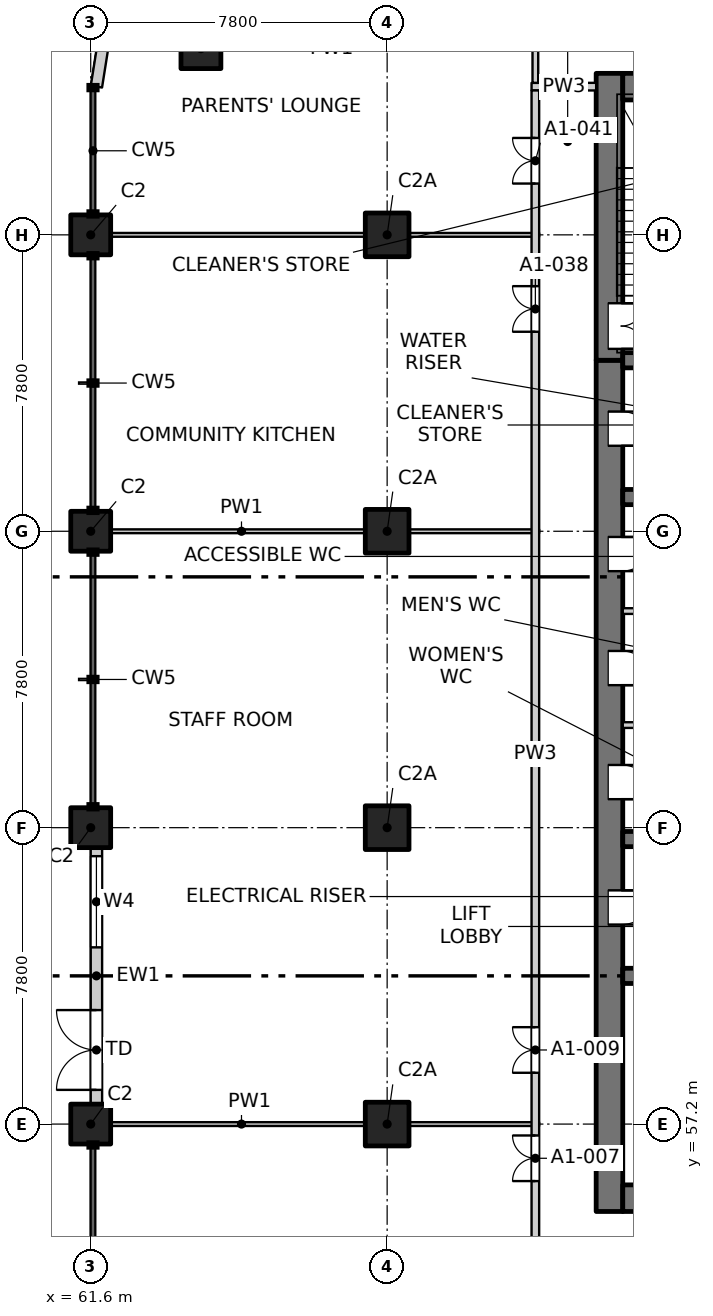
"""IFC4 building model, lengths in metres.
Left out: names, types, materials, properties, quantities, classifications, styles, units other than length and angle.
Written with IfcOpenShell. Run it as: python <this file> out.ifc"""

import sys

from ifc_helpers import new_model, si_unit, direction, frame, frame_2d, origin, origin_2d, place, context, subcontext, project, spatial, rectangle, extrude, element, fill, save


model = new_model("IFC4")
c1 = context("Model", 3, precision=1e-05, world=origin(), true_north=direction((0.0, 1.0)))
c2 = subcontext(c1, "Body", "Model", "MODEL_VIEW")
j1 = project(units=[si_unit("LENGTHUNIT", "METRE"), si_unit("PLANEANGLEUNIT", "RADIAN")], contexts=[c1])
p1 = place(None, origin())
s1 = spatial("IfcSite", under=j1, at=p1, CompositionType="ELEMENT")
p2 = place(p1, origin())
s2 = spatial("IfcBuilding", under=s1, at=p2, CompositionType="ELEMENT")
p3 = place(p2, frame((0.0, 0.0, 15.0)))
s3 = spatial("IfcBuildingStorey", under=s2, at=p3, CompositionType="ELEMENT", Elevation=15.0)
for number, where, z_axis, x_axis in (
    (1, (64.5, 85.5, -0.35), (0.0, 0.0, 1.0), (1.0, 0.0, 0.0)),
    (2, (61.6, 57.2, -0.35), (0.0, 0.0, 1.0), (1.0, 0.0, 0.0)),
    (3, (61.6, 65.0, -0.35), (0.0, 0.0, 1.0), (1.0, 0.0, 0.0)),
    (4, (61.6, 72.8, -0.35), (0.0, 0.0, 1.0), (1.0, 0.0, 0.0)),
    (5, (61.6, 80.6, -0.35), (0.0, 0.0, 1.0), (1.0, 0.0, 0.0)),
):
    element("IfcColumn", number, at=place(p3, frame(where, z_axis=z_axis, x_axis=x_axis)), inside=s3, PredefinedType="COLUMN", context=c2, shape_type="SweptSolid", body=[
        extrude(rectangle(XDim=1.05, YDim=1.05, at=origin_2d()), origin(), (0.0, 0.0, 1.0), 4.6),
    ])
for number, where, z_axis, x_axis in (
    (6, (69.4, 57.2, -0.35), (0.0, 0.0, 1.0), (1.0, 0.0, 0.0)),
    (7, (69.4, 65.0, -0.35), (0.0, 0.0, 1.0), (1.0, 0.0, 0.0)),
    (8, (69.4, 72.8, -0.35), (0.0, 0.0, 1.0), (1.0, 0.0, 0.0)),
    (9, (69.4, 80.6, -0.35), (0.0, 0.0, 1.0), (1.0, 0.0, 0.0)),
):
    element("IfcColumn", number, at=place(p3, frame(where, z_axis=z_axis, x_axis=x_axis)), inside=s3, PredefinedType="COLUMN", context=c2, shape_type="SweptSolid", body=[
        extrude(rectangle(XDim=1.15, YDim=1.15, at=origin_2d()), origin(), (0.0, 0.0, 1.0), 4.6),
    ])
p4 = place(p3, frame((75.25, 54.9, -0.35), z_axis=(0.0, 0.0, 1.0), x_axis=(0.0, 1.0, 0.0)))
e10 = element("IfcWall", 10, at=p4, inside=s3, PredefinedType="SOLIDWALL", context=c2, shape_type="SweptSolid", body=[
    extrude(rectangle(XDim=22.4, YDim=0.7, at=frame_2d((11.2, 0.0))), origin(), (0.0, 0.0, 1.0), 4.6),
])
p5 = place(p4, frame((7.55, 0.0, 0.35)))
e11 = element("IfcOpeningElement", 11, at=p5, cuts=e10, PredefinedType="OPENING", context=c2, shape_type="SweptSolid", body=[
    extrude(rectangle(XDim=0.9, YDim=2.1, at=frame_2d((0.45, 1.05))), frame((0.0, 0.36, 0.0), z_axis=(0.0, -1.0, 0.0), x_axis=(1.0, 0.0, 0.0)), (0.0, 0.0, 1.0), 0.72),
])
p6 = place(p4, frame((10.85, 0.0, 0.35)))
e12 = element("IfcOpeningElement", 12, at=p6, cuts=e10, PredefinedType="OPENING", context=c2, shape_type="SweptSolid", body=[
    extrude(rectangle(XDim=0.9, YDim=2.1, at=frame_2d((0.45, 1.05))), frame((0.0, 0.36, 0.0), z_axis=(0.0, -1.0, 0.0), x_axis=(1.0, 0.0, 0.0)), (0.0, 0.0, 1.0), 0.72),
])
p7 = place(p4, frame((13.85, 0.0, 0.35)))
e13 = element("IfcOpeningElement", 13, at=p7, cuts=e10, PredefinedType="OPENING", context=c2, shape_type="SweptSolid", body=[
    extrude(rectangle(XDim=0.9, YDim=2.1, at=frame_2d((0.45, 1.05))), frame((0.0, 0.36, 0.0), z_axis=(0.0, -1.0, 0.0), x_axis=(1.0, 0.0, 0.0)), (0.0, 0.0, 1.0), 0.72),
])
p8 = place(p4, frame((16.85, 0.0, 0.35)))
e14 = element("IfcOpeningElement", 14, at=p8, cuts=e10, PredefinedType="OPENING", context=c2, shape_type="SweptSolid", body=[
    extrude(rectangle(XDim=0.9, YDim=2.1, at=frame_2d((0.45, 1.05))), frame((0.0, 0.36, 0.0), z_axis=(0.0, -1.0, 0.0), x_axis=(1.0, 0.0, 0.0)), (0.0, 0.0, 1.0), 0.72),
])
p9 = place(p4, frame((20.15, 0.0, 0.35)))
e15 = element("IfcOpeningElement", 15, at=p9, cuts=e10, PredefinedType="OPENING", context=c2, shape_type="SweptSolid", body=[
    extrude(rectangle(XDim=0.9, YDim=2.1, at=frame_2d((0.45, 1.05))), frame((0.0, 0.36, 0.0), z_axis=(0.0, -1.0, 0.0), x_axis=(1.0, 0.0, 0.0)), (0.0, 0.0, 1.0), 0.72),
])
p10 = place(p3, frame((75.25, 77.3, -0.35), z_axis=(0.0, 0.0, 1.0), x_axis=(0.0, 1.0, 0.0)))
e16 = element("IfcWall", 16, at=p10, inside=s3, PredefinedType="SOLIDWALL", context=c2, shape_type="SweptSolid", body=[
    extrude(rectangle(XDim=7.55, YDim=0.7, at=frame_2d((3.775, 0.0))), origin(), (0.0, 0.0, 1.0), 4.6),
])
p11 = place(p10, frame((0.3, 0.0, 0.35)))
e17 = element("IfcOpeningElement", 17, at=p11, cuts=e16, PredefinedType="OPENING", context=c2, shape_type="SweptSolid", body=[
    extrude(rectangle(XDim=1.2, YDim=2.1, at=frame_2d((0.6, 1.05))), frame((0.0, 0.36, 0.0), z_axis=(0.0, -1.0, 0.0), x_axis=(1.0, 0.0, 0.0)), (0.0, 0.0, 1.0), 0.72),
])
p12 = place(p3, frame((75.6, 55.25, -0.35), z_axis=(0.0, 0.0, 1.0), x_axis=(1.0, 0.0, 0.0)))
e18 = element("IfcWall", 18, at=p12, inside=s3, PredefinedType="SOLIDWALL", context=c2, shape_type="SweptSolid", body=[
    extrude(rectangle(XDim=18.8, YDim=0.7, at=frame_2d((9.4, 0.0))), origin(), (0.0, 0.0, 1.0), 4.6),
])
p13 = place(p12, frame((8.65, 0.0, 0.35)))
e19 = element("IfcOpeningElement", 19, at=p13, cuts=e18, PredefinedType="OPENING", context=c2, shape_type="SweptSolid", body=[
    extrude(rectangle(XDim=1.5, YDim=2.1, at=frame_2d((0.75, 1.05))), frame((0.0, 0.36, 0.0), z_axis=(0.0, -1.0, 0.0), x_axis=(1.0, 0.0, 0.0)), (0.0, 0.0, 1.0), 0.72),
])
p14 = place(p3, frame((75.6, 84.5, -0.35), z_axis=(0.0, 0.0, 1.0), x_axis=(1.0, 0.0, 0.0)))
e20 = element("IfcWall", 20, at=p14, inside=s3, PredefinedType="SOLIDWALL", context=c2, shape_type="SweptSolid", body=[
    extrude(rectangle(XDim=18.8, YDim=0.7, at=frame_2d((9.4, 0.0))), origin(), (0.0, 0.0, 1.0), 4.6),
])
for number, where, z_axis, x_axis in (
    (21, (75.6, 61.1, -0.35), (0.0, 0.0, 1.0), (1.0, 0.0, 0.0)),
    (22, (75.6, 64.7, -0.35), (0.0, 0.0, 1.0), (1.0, 0.0, 0.0)),
    (23, (75.6, 73.7, -0.35), (0.0, 0.0, 1.0), (1.0, 0.0, 0.0)),
    (24, (75.6, 77.3, -0.35), (0.0, 0.0, 1.0), (1.0, 0.0, 0.0)),
):
    element("IfcWall", number, at=place(p3, frame(where, z_axis=z_axis, x_axis=x_axis)), inside=s3, PredefinedType="SOLIDWALL", context=c2, shape_type="SweptSolid", body=[
        extrude(rectangle(XDim=3.65, YDim=0.4, at=frame_2d((1.825, 0.0))), origin(), (0.0, 0.0, 1.0), 4.6),
    ])
p15 = place(p3, frame((61.75, 57.725, 0.0), z_axis=(0.0, 0.0, 1.0), x_axis=(0.0, 1.0, 0.0)))
e25 = element("IfcWall", 25, at=p15, inside=s3, PredefinedType="SOLIDWALL", context=c2, shape_type="SweptSolid", body=[
    extrude(rectangle(XDim=6.75, YDim=0.3, at=frame_2d((3.375, 0.0))), origin(), (0.0, 0.0, 1.0), 3.8),
])
p16 = place(p15, frame((0.375, 0.0, 0.0)))
e26 = element("IfcOpeningElement", 26, at=p16, cuts=e25, PredefinedType="OPENING", context=c2, shape_type="SweptSolid", body=[
    extrude(rectangle(XDim=2.1, YDim=2.4, at=frame_2d((1.05, 1.2))), frame((0.0, 0.16, 0.0), z_axis=(0.0, -1.0, 0.0), x_axis=(1.0, 0.0, 0.0)), (0.0, 0.0, 1.0), 0.32),
])
p17 = place(p15, frame((4.125, 0.0, 0.6)))
e27 = element("IfcOpeningElement", 27, at=p17, cuts=e25, PredefinedType="OPENING", context=c2, shape_type="SweptSolid", body=[
    extrude(rectangle(XDim=2.4, YDim=2.1, at=frame_2d((1.2, 1.05))), frame((0.0, 0.16, 0.0), z_axis=(0.0, -1.0, 0.0), x_axis=(1.0, 0.0, 0.0)), (0.0, 0.0, 1.0), 0.32),
])
p18 = place(p3, frame((61.934, 85.659, 0.0), z_axis=(0.0, 0.0, 1.0), x_axis=(-0.156496880861, -0.987678452879, 0.0)))
e28 = element("IfcWall", 28, at=p18, inside=s3, PredefinedType="SOLIDWALL", context=c2, shape_type="SweptSolid", body=[
    extrude(rectangle(XDim=1.173, YDim=0.3, at=frame_2d((0.586, 0.0))), origin(), (0.0, 0.0, 1.0), 3.8),
])
p19 = place(p3, frame((61.735, 57.2, 0.0), z_axis=(0.0, 0.0, 1.0), x_axis=(1.0, 0.0, 0.0)))
e29 = element("IfcWall", 29, at=p19, inside=s3, PredefinedType="PARTITIONING", context=c2, shape_type="SweptSolid", body=[
    extrude(rectangle(XDim=7.665, YDim=0.1, at=frame_2d((3.833, 0.0))), origin(), (0.0, 0.0, 1.0), 3.65),
])
p20 = place(p3, frame((69.4, 57.2, 0.0), z_axis=(0.0, 0.0, 1.0), x_axis=(1.0, 0.0, 0.0)))
e30 = element("IfcWall", 30, at=p20, inside=s3, PredefinedType="PARTITIONING", context=c2, shape_type="SweptSolid", body=[
    extrude(rectangle(XDim=4.0, YDim=0.1, at=frame_2d((2.0, 0.0))), origin(), (0.0, 0.0, 1.0), 4.25),
])
for number, where, z_axis, x_axis in (
    (31, (75.6, 67.7, 0.0), (0.0, 0.0, 1.0), (1.0, 0.0, 0.0)),
    (32, (75.6, 70.7, 0.0), (0.0, 0.0, 1.0), (1.0, 0.0, 0.0)),
):
    element("IfcWall", number, at=place(p3, frame(where, z_axis=z_axis, x_axis=x_axis)), inside=s3, PredefinedType="PARTITIONING", context=c2, shape_type="SweptSolid", body=[
        extrude(rectangle(XDim=3.65, YDim=0.15, at=frame_2d((1.825, 0.0))), origin(), (0.0, 0.0, 1.0), 4.25),
    ])
p21 = place(p3, frame((61.735, 72.8, 0.0), z_axis=(0.0, 0.0, 1.0), x_axis=(1.0, 0.0, 0.0)))
e33 = element("IfcWall", 33, at=p21, inside=s3, PredefinedType="PARTITIONING", context=c2, shape_type="SweptSolid", body=[
    extrude(rectangle(XDim=7.665, YDim=0.1, at=frame_2d((3.833, 0.0))), origin(), (0.0, 0.0, 1.0), 3.65),
])
p22 = place(p3, frame((69.4, 72.8, 0.0), z_axis=(0.0, 0.0, 1.0), x_axis=(1.0, 0.0, 0.0)))
e34 = element("IfcWall", 34, at=p22, inside=s3, PredefinedType="PARTITIONING", context=c2, shape_type="SweptSolid", body=[
    extrude(rectangle(XDim=4.0, YDim=0.1, at=frame_2d((2.0, 0.0))), origin(), (0.0, 0.0, 1.0), 4.25),
])
p23 = place(p3, frame((61.735, 80.6, 0.0), z_axis=(0.0, 0.0, 1.0), x_axis=(1.0, 0.0, 0.0)))
e35 = element("IfcWall", 35, at=p23, inside=s3, PredefinedType="PARTITIONING", context=c2, shape_type="SweptSolid", body=[
    extrude(rectangle(XDim=7.665, YDim=0.1, at=frame_2d((3.833, 0.0))), origin(), (0.0, 0.0, 1.0), 3.65),
])
p24 = place(p3, frame((69.4, 80.6, 0.0), z_axis=(0.0, 0.0, 1.0), x_axis=(1.0, 0.0, 0.0)))
e36 = element("IfcWall", 36, at=p24, inside=s3, PredefinedType="PARTITIONING", context=c2, shape_type="SweptSolid", body=[
    extrude(rectangle(XDim=4.0, YDim=0.1, at=frame_2d((2.0, 0.0))), origin(), (0.0, 0.0, 1.0), 4.25),
])
p25 = place(p3, frame((73.2, 84.5, 0.0), z_axis=(0.0, 0.0, 1.0), x_axis=(1.0, 0.0, 0.0)))
e37 = element("IfcWall", 37, at=p25, inside=s3, PredefinedType="PARTITIONING", context=c2, shape_type="SweptSolid", body=[
    extrude(rectangle(XDim=1.7, YDim=0.2, at=frame_2d((0.85, 0.0))), origin(), (0.0, 0.0, 1.0), 4.25),
])
p26 = place(p3, frame((73.3, 49.5, 0.0), z_axis=(0.0, 0.0, 1.0), x_axis=(0.0, 1.0, 0.0)))
e38 = element("IfcWall", 38, at=p26, inside=s3, PredefinedType="PARTITIONING", context=c2, shape_type="SweptSolid", body=[
    extrude(rectangle(XDim=34.9, YDim=0.2, at=frame_2d((17.45, 0.0))), origin(), (0.0, 0.0, 1.0), 4.25),
])
p27 = place(p26, frame((6.2, 0.0, 0.0)))
e39 = element("IfcOpeningElement", 39, at=p27, cuts=e38, PredefinedType="OPENING", context=c2, shape_type="SweptSolid", body=[
    extrude(rectangle(XDim=1.2, YDim=2.1, at=frame_2d((0.6, 1.05))), frame((0.0, 0.11, 0.0), z_axis=(0.0, -1.0, 0.0), x_axis=(1.0, 0.0, 0.0)), (0.0, 0.0, 1.0), 0.22),
])
p28 = place(p26, frame((9.05, 0.0, 0.0)))
e40 = element("IfcOpeningElement", 40, at=p28, cuts=e38, PredefinedType="OPENING", context=c2, shape_type="SweptSolid", body=[
    extrude(rectangle(XDim=1.2, YDim=2.1, at=frame_2d((0.6, 1.05))), frame((0.0, 0.11, 0.0), z_axis=(0.0, -1.0, 0.0), x_axis=(1.0, 0.0, 0.0)), (0.0, 0.0, 1.0), 0.22),
])
p29 = place(p26, frame((28.55, 0.0, 0.0)))
e41 = element("IfcOpeningElement", 41, at=p29, cuts=e38, PredefinedType="OPENING", context=c2, shape_type="SweptSolid", body=[
    extrude(rectangle(XDim=1.2, YDim=2.1, at=frame_2d((0.6, 1.05))), frame((0.0, 0.11, 0.0), z_axis=(0.0, -1.0, 0.0), x_axis=(1.0, 0.0, 0.0)), (0.0, 0.0, 1.0), 0.22),
])
p30 = place(p26, frame((32.45, 0.0, 0.0)))
e42 = element("IfcOpeningElement", 42, at=p30, cuts=e38, PredefinedType="OPENING", context=c2, shape_type="SweptSolid", body=[
    extrude(rectangle(XDim=1.2, YDim=2.1, at=frame_2d((0.6, 1.05))), frame((0.0, 0.11, 0.0), z_axis=(0.0, -1.0, 0.0), x_axis=(1.0, 0.0, 0.0)), (0.0, 0.0, 1.0), 0.22),
])
p31 = place(p3, frame((73.3, 84.6, 0.0), z_axis=(0.0, 0.0, 1.0), x_axis=(0.0, 1.0, 0.0)))
e43 = element("IfcWall", 43, at=p31, inside=s3, PredefinedType="PARTITIONING", context=c2, shape_type="SweptSolid", body=[
    extrude(rectangle(XDim=3.665, YDim=0.15, at=frame_2d((1.833, 0.0))), origin(), (0.0, 0.0, 1.0), 4.25),
])
p32 = place(p31, frame((1.25, 0.0, 0.0)))
e44 = element("IfcOpeningElement", 44, at=p32, cuts=e43, PredefinedType="OPENING", context=c2, shape_type="SweptSolid", body=[
    extrude(rectangle(XDim=1.2, YDim=2.1, at=frame_2d((0.6, 1.05))), frame((0.0, 0.085, 0.0), z_axis=(0.0, -1.0, 0.0), x_axis=(1.0, 0.0, 0.0)), (0.0, 0.0, 1.0), 0.17),
])
p33 = place(p16, origin())
e45 = element("IfcDoor", 45, at=p33, inside=s3, OperationType="DOUBLE_DOOR_SINGLE_SWING", PredefinedType="DOOR", context=c2, shape_type="SweptSolid", body=[
    extrude(rectangle(XDim=2.1, YDim=2.4, at=frame_2d((1.05, 1.2))), frame((0.0, 0.025, 0.0), z_axis=(0.0, -1.0, 0.0), x_axis=(1.0, 0.0, 0.0)), (0.0, 0.0, 1.0), 0.05),
])
fill(e26, e45)
p34 = place(p17, origin())
e46 = element("IfcWindow", 46, at=p34, inside=s3, PartitioningType="SINGLE_PANEL", PredefinedType="WINDOW", context=c2, shape_type="SweptSolid", body=[
    extrude(rectangle(XDim=2.4, YDim=2.1, at=frame_2d((1.2, 1.05))), frame((0.0, 0.03, 0.0), z_axis=(0.0, -1.0, 0.0), x_axis=(1.0, 0.0, 0.0)), (0.0, 0.0, 1.0), 0.06),
])
fill(e27, e46)
p35 = place(p27, origin())
e47 = element("IfcDoor", 47, at=p35, inside=s3, OperationType="DOUBLE_DOOR_SINGLE_SWING", PredefinedType="DOOR", context=c2, shape_type="SweptSolid", body=[
    extrude(rectangle(XDim=1.2, YDim=2.1, at=frame_2d((0.6, 1.05))), frame((0.0, 0.025, 0.0), z_axis=(0.0, -1.0, 0.0), x_axis=(1.0, 0.0, 0.0)), (0.0, 0.0, 1.0), 0.05),
])
fill(e39, e47)
p36 = place(p28, origin())
e48 = element("IfcDoor", 48, at=p36, inside=s3, OperationType="DOUBLE_DOOR_SINGLE_SWING", PredefinedType="DOOR", context=c2, shape_type="SweptSolid", body=[
    extrude(rectangle(XDim=1.2, YDim=2.1, at=frame_2d((0.6, 1.05))), frame((0.0, 0.025, 0.0), z_axis=(0.0, -1.0, 0.0), x_axis=(1.0, 0.0, 0.0)), (0.0, 0.0, 1.0), 0.05),
])
fill(e40, e48)
p37 = place(p5, origin())
e49 = element("IfcDoor", 49, at=p37, inside=s3, OperationType="SINGLE_SWING_LEFT", PredefinedType="DOOR", context=c2, shape_type="SweptSolid", body=[
    extrude(rectangle(XDim=0.9, YDim=2.1, at=frame_2d((0.45, 1.05))), frame((0.0, -0.285, 0.0), z_axis=(0.0, -1.0, 0.0), x_axis=(1.0, 0.0, 0.0)), (0.0, 0.0, 1.0), 0.05),
])
fill(e11, e49)
p38 = place(p6, origin())
e50 = element("IfcDoor", 50, at=p38, inside=s3, OperationType="SINGLE_SWING_RIGHT", PredefinedType="DOOR", context=c2, shape_type="SweptSolid", body=[
    extrude(rectangle(XDim=0.9, YDim=2.1, at=frame_2d((0.45, 1.05))), frame((0.0, -0.285, 0.0), z_axis=(0.0, -1.0, 0.0), x_axis=(1.0, 0.0, 0.0)), (0.0, 0.0, 1.0), 0.05),
])
fill(e12, e50)
p39 = place(p7, origin())
e51 = element("IfcDoor", 51, at=p39, inside=s3, OperationType="SINGLE_SWING_RIGHT", PredefinedType="DOOR", context=c2, shape_type="SweptSolid", body=[
    extrude(rectangle(XDim=0.9, YDim=2.1, at=frame_2d((0.45, 1.05))), frame((0.0, -0.285, 0.0), z_axis=(0.0, -1.0, 0.0), x_axis=(1.0, 0.0, 0.0)), (0.0, 0.0, 1.0), 0.05),
])
fill(e13, e51)
p40 = place(p8, origin())
e52 = element("IfcDoor", 52, at=p40, inside=s3, OperationType="SINGLE_SWING_LEFT", PredefinedType="DOOR", context=c2, shape_type="SweptSolid", body=[
    extrude(rectangle(XDim=0.9, YDim=2.1, at=frame_2d((0.45, 1.05))), frame((0.0, -0.285, 0.0), z_axis=(0.0, -1.0, 0.0), x_axis=(1.0, 0.0, 0.0)), (0.0, 0.0, 1.0), 0.05),
])
fill(e14, e52)
p41 = place(p9, origin())
e53 = element("IfcDoor", 53, at=p41, inside=s3, OperationType="SINGLE_SWING_RIGHT", PredefinedType="DOOR", context=c2, shape_type="SweptSolid", body=[
    extrude(rectangle(XDim=0.9, YDim=2.1, at=frame_2d((0.45, 1.05))), frame((0.0, -0.285, 0.0), z_axis=(0.0, -1.0, 0.0), x_axis=(1.0, 0.0, 0.0)), (0.0, 0.0, 1.0), 0.05),
])
fill(e15, e53)
p42 = place(p11, origin())
e54 = element("IfcDoor", 54, at=p42, inside=s3, OperationType="DOUBLE_DOOR_SINGLE_SWING", PredefinedType="DOOR", context=c2, shape_type="SweptSolid", body=[
    extrude(rectangle(XDim=1.2, YDim=2.1, at=frame_2d((0.6, 1.05))), frame((0.0, -0.285, 0.0), z_axis=(0.0, -1.0, 0.0), x_axis=(1.0, 0.0, 0.0)), (0.0, 0.0, 1.0), 0.05),
])
fill(e17, e54)
p43 = place(p29, origin())
e55 = element("IfcDoor", 55, at=p43, inside=s3, OperationType="DOUBLE_DOOR_SINGLE_SWING", PredefinedType="DOOR", context=c2, shape_type="SweptSolid", body=[
    extrude(rectangle(XDim=1.2, YDim=2.1, at=frame_2d((0.6, 1.05))), frame((0.0, 0.025, 0.0), z_axis=(0.0, -1.0, 0.0), x_axis=(1.0, 0.0, 0.0)), (0.0, 0.0, 1.0), 0.05),
])
fill(e41, e55)
p44 = place(p30, origin())
e56 = element("IfcDoor", 56, at=p44, inside=s3, OperationType="DOUBLE_DOOR_SINGLE_SWING", PredefinedType="DOOR", context=c2, shape_type="SweptSolid", body=[
    extrude(rectangle(XDim=1.2, YDim=2.1, at=frame_2d((0.6, 1.05))), frame((0.0, 0.025, 0.0), z_axis=(0.0, -1.0, 0.0), x_axis=(1.0, 0.0, 0.0)), (0.0, 0.0, 1.0), 0.05),
])
fill(e42, e56)
save(model, sys.argv[1])
